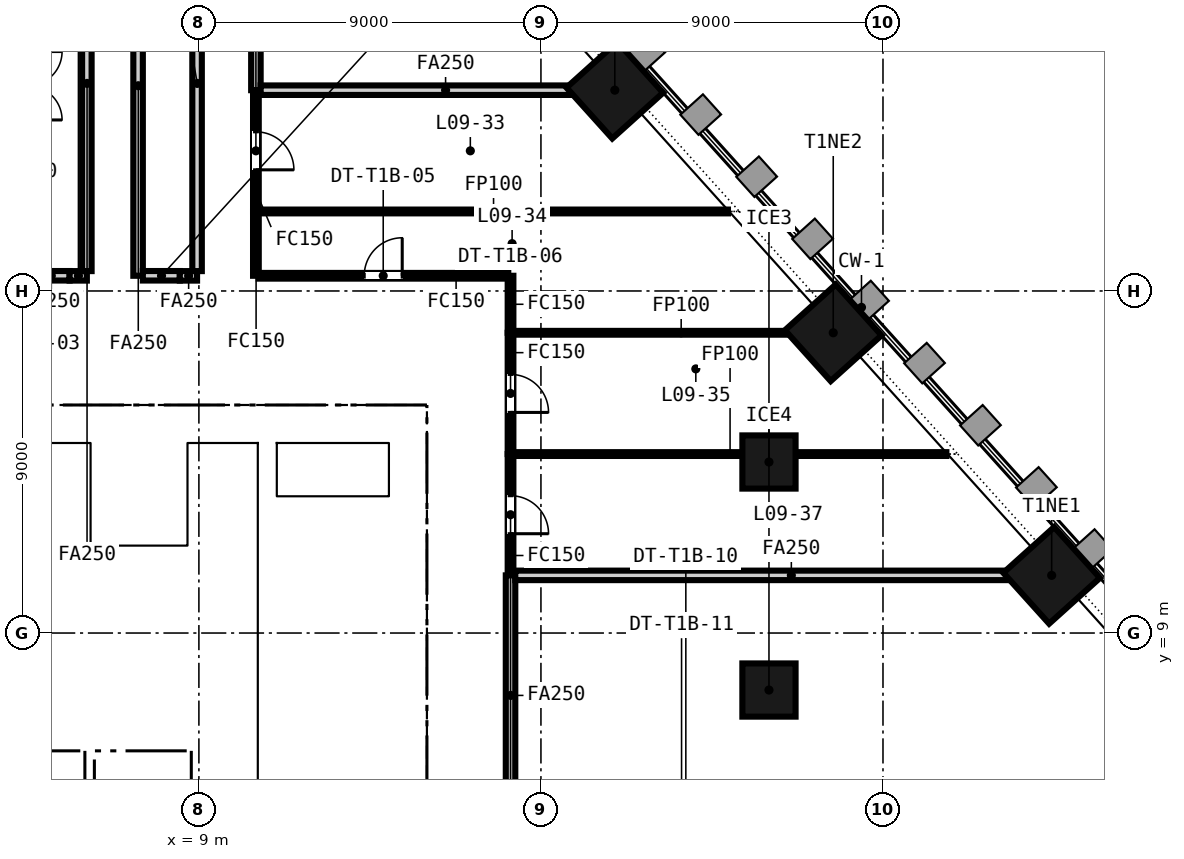
"""IFC4 building model, lengths in metres.
Left out: names, types, materials, properties, quantities, classifications, styles, units other than length and angle.
Written with IfcOpenShell. Run it as: python <this file> out.ifc"""

import sys

from ifc_helpers import new_model, si_unit, direction, frame, frame_2d, origin, origin_2d, place, context, subcontext, project, spatial, rectangle, extrude, element, fill, save


model = new_model("IFC4")
c1 = context("Model", 3, precision=1e-05, world=origin(), true_north=direction((0.0, 1.0)))
c2 = subcontext(c1, "Body", "Model", "MODEL_VIEW")
j1 = project(units=[si_unit("LENGTHUNIT", "METRE"), si_unit("PLANEANGLEUNIT", "RADIAN")], contexts=[c1])
p1 = place(None, origin())
s1 = spatial("IfcSite", under=j1, at=p1, CompositionType="ELEMENT")
p2 = place(p1, origin())
s2 = spatial("IfcBuilding", under=s1, at=p2, CompositionType="ELEMENT")
p3 = place(p2, frame((0.0, 0.0, 46.95)))
s3 = spatial("IfcBuildingStorey", under=s2, at=p3, CompositionType="ELEMENT", Elevation=46.95)
p4 = place(p3, frame((-15.0, 14.5, -0.15), z_axis=(0.0, 0.0, 1.0), x_axis=(1.0, 0.0, 0.0)))
e1 = element("IfcWall", 1, at=p4, inside=s3, PredefinedType="SOLIDWALL", context=c2, shape_type="SweptSolid", body=[
    extrude(rectangle(XDim=30.0, YDim=1.0, at=frame_2d((15.0, 0.0))), origin(), (0.0, 0.0, 1.0), 3.65),
])
p5 = place(p4, frame((9.25, 0.0, 0.15)))
e2 = element("IfcOpeningElement", 2, at=p5, cuts=e1, PredefinedType="OPENING", context=c2, shape_type="SweptSolid", body=[
    extrude(rectangle(XDim=1.5, YDim=2.1, at=frame_2d((0.75, 1.05))), frame((0.0, 0.51, 0.0), z_axis=(0.0, -1.0, 0.0), x_axis=(1.0, 0.0, 0.0)), (0.0, 0.0, 1.0), 1.02),
])
p6 = place(p4, frame((19.4, 0.0, 0.15)))
e3 = element("IfcOpeningElement", 3, at=p6, cuts=e1, PredefinedType="OPENING", context=c2, shape_type="SweptSolid", body=[
    extrude(rectangle(XDim=1.5, YDim=2.1, at=frame_2d((0.75, 1.05))), frame((0.0, 0.51, 0.0), z_axis=(0.0, -1.0, 0.0), x_axis=(1.0, 0.0, 0.0)), (0.0, 0.0, 1.0), 1.02),
])
p7 = place(p4, frame((1.5, 0.0, 0.15)))
e4 = element("IfcOpeningElement", 4, at=p7, cuts=e1, PredefinedType="OPENING", context=c2, shape_type="SweptSolid", body=[
    extrude(rectangle(XDim=1.2, YDim=2.1, at=frame_2d((0.6, 1.05))), frame((0.0, 0.51, 0.0), z_axis=(0.0, -1.0, 0.0), x_axis=(1.0, 0.0, 0.0)), (0.0, 0.0, 1.0), 1.02),
])
p8 = place(p4, frame((27.3, 0.0, 0.15)))
e5 = element("IfcOpeningElement", 5, at=p8, cuts=e1, PredefinedType="OPENING", context=c2, shape_type="SweptSolid", body=[
    extrude(rectangle(XDim=1.2, YDim=2.1, at=frame_2d((0.6, 1.05))), frame((0.0, 0.51, 0.0), z_axis=(0.0, -1.0, 0.0), x_axis=(1.0, 0.0, 0.0)), (0.0, 0.0, 1.0), 1.02),
])
p9 = place(p3, frame((14.5, 1.0, -0.15), z_axis=(0.0, 0.0, 1.0), x_axis=(0.0, 1.0, 0.0)))
e6 = element("IfcWall", 6, at=p9, inside=s3, PredefinedType="SOLIDWALL", context=c2, shape_type="SweptSolid", body=[
    extrude(rectangle(XDim=13.0, YDim=1.0, at=frame_2d((6.5, 0.0))), origin(), (0.0, 0.0, 1.0), 3.65),
])
p10 = place(p3, frame((10.8, 1.0, -0.15), z_axis=(0.0, 0.0, 1.0), x_axis=(0.0, 1.0, 0.0)))
e7 = element("IfcWall", 7, at=p10, inside=s3, PredefinedType="SOLIDWALL", context=c2, shape_type="SweptSolid", body=[
    extrude(rectangle(XDim=13.0, YDim=0.5, at=frame_2d((6.5, 0.0))), origin(), (0.0, 0.0, 1.0), 3.65),
])
for number, where, z_axis, x_axis in (
    (8, (31.438, 10.517, -0.15), (0.0, 0.0, 1.0), (-0.669, 0.743, 0.0)),
    (9, (25.691, 16.9, -0.15), (0.0, 0.0, 1.0), (-0.669, 0.743, 0.0)),
    (10, (19.944, 23.283, -0.15), (0.0, 0.0, 1.0), (-0.669, 0.743, 0.0)),
):
    element("IfcColumn", number, at=place(p3, frame(where, z_axis=z_axis, x_axis=x_axis)), inside=s3, PredefinedType="COLUMN", context=c2, shape_type="SweptSolid", body=[
        extrude(rectangle(XDim=1.8, YDim=1.8, at=origin_2d()), origin(), (0.0, 0.0, 1.0), 3.65),
    ])
for number, where, z_axis, x_axis in (
    (11, (24.0, 7.5, -0.15), (0.0, 0.0, 1.0), (1.0, 0.0, 0.0)),
    (12, (24.0, 13.5, -0.15), (0.0, 0.0, 1.0), (1.0, 0.0, 0.0)),
):
    element("IfcColumn", number, at=place(p3, frame(where, z_axis=z_axis, x_axis=x_axis)), inside=s3, PredefinedType="COLUMN", context=c2, shape_type="SweptSolid", body=[
        extrude(rectangle(XDim=1.4, YDim=1.4, at=origin_2d()), origin(), (0.0, 0.0, 1.0), 3.65),
    ])
p11 = place(p3, frame((-10.55, 6.025, 0.0), z_axis=(0.0, 0.0, 1.0), x_axis=(1.0, 0.0, 0.0)))
e13 = element("IfcWall", 13, at=p11, inside=s3, PredefinedType="PARTITIONING", context=c2, shape_type="SweptSolid", body=[
    extrude(rectangle(XDim=21.1, YDim=0.25, at=frame_2d((10.55, 0.0))), origin(), (0.0, 0.0, 1.0), 3.5),
])
p12 = place(p3, frame((-4.125, 8.55, 0.0), z_axis=(0.0, 0.0, 1.0), x_axis=(1.0, 0.0, 0.0)))
e14 = element("IfcWall", 14, at=p12, inside=s3, PredefinedType="PARTITIONING", context=c2, shape_type="SweptSolid", body=[
    extrude(rectangle(XDim=14.675, YDim=0.2, at=frame_2d((7.337, 0.0))), origin(), (0.0, 0.0, 1.0), 3.5),
])
p13 = place(p12, frame((2.438, 0.0, 0.0)))
e15 = element("IfcOpeningElement", 15, at=p13, cuts=e14, PredefinedType="OPENING", context=c2, shape_type="SweptSolid", body=[
    extrude(rectangle(XDim=1.0, YDim=2.1, at=frame_2d((0.5, 1.05))), frame((0.0, 0.11, 0.0), z_axis=(0.0, -1.0, 0.0), x_axis=(1.0, 0.0, 0.0)), (0.0, 0.0, 1.0), 0.22),
])
p14 = place(p12, frame((6.775, 0.0, 0.0)))
e16 = element("IfcOpeningElement", 16, at=p14, cuts=e14, PredefinedType="OPENING", context=c2, shape_type="SweptSolid", body=[
    extrude(rectangle(XDim=1.0, YDim=2.1, at=frame_2d((0.5, 1.05))), frame((0.0, 0.11, 0.0), z_axis=(0.0, -1.0, 0.0), x_axis=(1.0, 0.0, 0.0)), (0.0, 0.0, 1.0), 0.22),
])
p15 = place(p12, frame((10.363, 0.0, 0.0)))
e17 = element("IfcOpeningElement", 17, at=p15, cuts=e14, PredefinedType="OPENING", context=c2, shape_type="SweptSolid", body=[
    extrude(rectangle(XDim=1.0, YDim=2.1, at=frame_2d((0.5, 1.05))), frame((0.0, 0.11, 0.0), z_axis=(0.0, -1.0, 0.0), x_axis=(1.0, 0.0, 0.0)), (0.0, 0.0, 1.0), 0.22),
])
p16 = place(p12, frame((13.475, 0.0, 0.0)))
e18 = element("IfcOpeningElement", 18, at=p16, cuts=e14, PredefinedType="OPENING", context=c2, shape_type="SweptSolid", body=[
    extrude(rectangle(XDim=0.9, YDim=2.1, at=frame_2d((0.45, 1.05))), frame((0.0, 0.11, 0.0), z_axis=(0.0, -1.0, 0.0), x_axis=(1.0, 0.0, 0.0)), (0.0, 0.0, 1.0), 0.22),
])
p17 = place(p3, frame((5.9, 11.2, 0.0), z_axis=(0.0, 0.0, 1.0), x_axis=(1.0, 0.0, 0.0)))
e19 = element("IfcWall", 19, at=p17, inside=s3, PredefinedType="PARTITIONING", context=c2, shape_type="SweptSolid", body=[
    extrude(rectangle(XDim=4.65, YDim=0.2, at=frame_2d((2.325, 0.0))), origin(), (0.0, 0.0, 1.0), 3.5),
])
p18 = place(p17, frame((3.4, 0.0, 0.0)))
e20 = element("IfcOpeningElement", 20, at=p18, cuts=e19, PredefinedType="OPENING", context=c2, shape_type="SweptSolid", body=[
    extrude(rectangle(XDim=0.9, YDim=2.1, at=frame_2d((0.45, 1.05))), frame((0.0, 0.11, 0.0), z_axis=(0.0, -1.0, 0.0), x_axis=(1.0, 0.0, 0.0)), (0.0, 0.0, 1.0), 0.22),
])
for number, where, z_axis, x_axis in (
    (21, (6.125, 3.6, 0.0), (0.0, 0.0, 1.0), (0.0, 1.0, 0.0)),
    (22, (8.925, 3.6, 0.0), (0.0, 0.0, 1.0), (0.0, 1.0, 0.0)),
):
    element("IfcWall", number, at=place(p3, frame(where, z_axis=z_axis, x_axis=x_axis)), inside=s3, PredefinedType="PARTITIONING", context=c2, shape_type="SweptSolid", body=[
        extrude(rectangle(XDim=2.3, YDim=0.25, at=frame_2d((1.15, 0.0))), origin(), (0.0, 0.0, 1.0), 3.5),
    ])
p19 = place(p3, frame((8.925, 6.15, 0.0), z_axis=(0.0, 0.0, 1.0), x_axis=(0.0, 1.0, 0.0)))
e23 = element("IfcWall", 23, at=p19, inside=s3, PredefinedType="PARTITIONING", context=c2, shape_type="SweptSolid", body=[
    extrude(rectangle(XDim=2.3, YDim=0.25, at=frame_2d((1.15, 0.0))), origin(), (0.0, 0.0, 1.0), 3.5),
])
for number, where, z_axis, x_axis in (
    (24, (6.025, 11.3, 0.0), (0.0, 0.0, 1.0), (0.0, 1.0, 0.0)),
    (25, (8.825, 11.3, 0.0), (0.0, 0.0, 1.0), (0.0, 1.0, 0.0)),
):
    element("IfcWall", number, at=place(p3, frame(where, z_axis=z_axis, x_axis=x_axis)), inside=s3, PredefinedType="PARTITIONING", context=c2, shape_type="SweptSolid", body=[
        extrude(rectangle(XDim=2.7, YDim=0.25, at=frame_2d((1.35, 0.0))), origin(), (0.0, 0.0, 1.0), 3.5),
    ])
p20 = place(p3, frame((11.05, 7.35, -0.15), z_axis=(0.0, 0.0, 1.0), x_axis=(1.0, 0.0, 0.0)))
e26 = element("IfcWall", 26, at=p20, inside=s3, PredefinedType="SOLIDWALL", context=c2, shape_type="SweptSolid", body=[
    extrude(rectangle(XDim=2.95, YDim=0.3, at=frame_2d((1.475, 0.0))), origin(), (0.0, 0.0, 1.0), 3.65),
])
p21 = place(p3, frame((7.4, 28.4, 0.0), z_axis=(0.0, 0.0, 1.0), x_axis=(0.0, -1.0, 0.0)))
e27 = element("IfcWall", 27, at=p21, inside=s3, PredefinedType="PARTITIONING", context=c2, shape_type="SweptSolid", body=[
    extrude(rectangle(XDim=10.0, YDim=0.25, at=frame_2d((5.0, 0.0))), origin(), (0.0, 0.0, 1.0), 2.741),
])
p22 = place(p3, frame((10.5, 28.4, 0.0), z_axis=(0.0, 0.0, 1.0), x_axis=(0.0, -1.0, 0.0)))
e28 = element("IfcWall", 28, at=p22, inside=s3, PredefinedType="PARTITIONING", context=c2, shape_type="SweptSolid", body=[
    extrude(rectangle(XDim=5.117, YDim=0.25, at=frame_2d((2.559, 0.0))), origin(), (0.0, 0.0, 1.0), 2.741),
])
p23 = place(p3, frame((10.5, 23.283, 0.0), z_axis=(0.0, 0.0, 1.0), x_axis=(0.0, -1.0, 0.0)))
e29 = element("IfcWall", 29, at=p23, inside=s3, PredefinedType="PARTITIONING", context=c2, shape_type="SweptSolid", body=[
    extrude(rectangle(XDim=3.191, YDim=0.15, at=frame_2d((1.595, 0.0))), origin(), (0.0, 0.0, 1.0), 2.741),
])
p24 = place(p23, frame((1.095, 0.0, 0.0)))
e30 = element("IfcOpeningElement", 30, at=p24, cuts=e29, PredefinedType="OPENING", context=c2, shape_type="SweptSolid", body=[
    extrude(rectangle(XDim=1.0, YDim=2.1, at=frame_2d((0.5, 1.05))), frame((0.0, 0.085, 0.0), z_axis=(0.0, -1.0, 0.0), x_axis=(1.0, 0.0, 0.0)), (0.0, 0.0, 1.0), 0.17),
])
p25 = place(p3, frame((10.5, 20.092, 0.0), z_axis=(0.0, 0.0, 1.0), x_axis=(0.0, -1.0, 0.0)))
e31 = element("IfcWall", 31, at=p25, inside=s3, PredefinedType="PARTITIONING", context=c2, shape_type="SweptSolid", body=[
    extrude(rectangle(XDim=1.692, YDim=0.15, at=frame_2d((0.846, 0.0))), origin(), (0.0, 0.0, 1.0), 2.741),
])
p26 = place(p3, frame((17.2, 18.4, 0.0), z_axis=(0.0, 0.0, 1.0), x_axis=(0.0, -1.0, 0.0)))
e32 = element("IfcWall", 32, at=p26, inside=s3, PredefinedType="PARTITIONING", context=c2, shape_type="SweptSolid", body=[
    extrude(rectangle(XDim=1.5, YDim=0.15, at=frame_2d((0.75, 0.0))), origin(), (0.0, 0.0, 1.0), 2.741),
])
p27 = place(p3, frame((17.2, 16.9, 0.0), z_axis=(0.0, 0.0, 1.0), x_axis=(0.0, -1.0, 0.0)))
e33 = element("IfcWall", 33, at=p27, inside=s3, PredefinedType="PARTITIONING", context=c2, shape_type="SweptSolid", body=[
    extrude(rectangle(XDim=3.191, YDim=0.15, at=frame_2d((1.595, 0.0))), origin(), (0.0, 0.0, 1.0), 2.741),
])
p28 = place(p27, frame((1.095, 0.0, 0.0)))
e34 = element("IfcOpeningElement", 34, at=p28, cuts=e33, PredefinedType="OPENING", context=c2, shape_type="SweptSolid", body=[
    extrude(rectangle(XDim=1.0, YDim=2.1, at=frame_2d((0.5, 1.05))), frame((0.0, 0.085, 0.0), z_axis=(0.0, -1.0, 0.0), x_axis=(1.0, 0.0, 0.0)), (0.0, 0.0, 1.0), 0.17),
])
p29 = place(p3, frame((17.2, 13.709, 0.0), z_axis=(0.0, 0.0, 1.0), x_axis=(0.0, -1.0, 0.0)))
e35 = element("IfcWall", 35, at=p29, inside=s3, PredefinedType="PARTITIONING", context=c2, shape_type="SweptSolid", body=[
    extrude(rectangle(XDim=3.192, YDim=0.15, at=frame_2d((1.596, 0.0))), origin(), (0.0, 0.0, 1.0), 2.741),
])
p30 = place(p29, frame((1.096, 0.0, 0.0)))
e36 = element("IfcOpeningElement", 36, at=p30, cuts=e35, PredefinedType="OPENING", context=c2, shape_type="SweptSolid", body=[
    extrude(rectangle(XDim=1.0, YDim=2.1, at=frame_2d((0.5, 1.05))), frame((0.0, 0.085, 0.0), z_axis=(0.0, -1.0, 0.0), x_axis=(1.0, 0.0, 0.0)), (0.0, 0.0, 1.0), 0.17),
])
p31 = place(p3, frame((17.2, 10.517, 0.0), z_axis=(0.0, 0.0, 1.0), x_axis=(0.0, -1.0, 0.0)))
e37 = element("IfcWall", 37, at=p31, inside=s3, PredefinedType="PARTITIONING", context=c2, shape_type="SweptSolid", body=[
    extrude(rectangle(XDim=6.317, YDim=0.25, at=frame_2d((3.159, 0.0))), origin(), (0.0, 0.0, 1.0), 2.741),
])
p32 = place(p3, frame((4.625, 18.4, 0.0), z_axis=(0.0, 0.0, 1.0), x_axis=(1.0, 0.0, 0.0)))
e38 = element("IfcWall", 38, at=p32, inside=s3, PredefinedType="PARTITIONING", context=c2, shape_type="SweptSolid", body=[
    extrude(rectangle(XDim=0.973, YDim=0.25, at=frame_2d((0.486, 0.0))), origin(), (0.0, 0.0, 1.0), 2.741),
])
p33 = place(p3, frame((5.598, 18.398, 0.0), z_axis=(0.0, 0.0, 1.0), x_axis=(1.0, 0.0, 0.0)))
e39 = element("IfcWall", 39, at=p33, inside=s3, PredefinedType="PARTITIONING", context=c2, shape_type="SweptSolid", body=[
    extrude(rectangle(XDim=0.454, YDim=0.25, at=frame_2d((0.227, 0.0))), origin(), (0.0, 0.0, 1.0), 2.741),
])
p34 = place(p3, frame((6.052, 18.523, 0.0), z_axis=(0.0, 0.0, 1.0), x_axis=(0.0, 1.0, 0.0)))
e40 = element("IfcWall", 40, at=p34, inside=s3, PredefinedType="PARTITIONING", context=c2, shape_type="SweptSolid", body=[
    extrude(rectangle(XDim=9.877, YDim=0.25, at=frame_2d((4.938, 0.0))), origin(), (0.0, 0.0, 1.0), 2.741),
])
p35 = place(p3, frame((7.525, 18.4, 0.0), z_axis=(0.0, 0.0, 1.0), x_axis=(1.0, 0.0, 0.0)))
e41 = element("IfcWall", 41, at=p35, inside=s3, PredefinedType="PARTITIONING", context=c2, shape_type="SweptSolid", body=[
    extrude(rectangle(XDim=0.973, YDim=0.25, at=frame_2d((0.487, 0.0))), origin(), (0.0, 0.0, 1.0), 2.741),
])
p36 = place(p3, frame((8.498, 18.398, 0.0), z_axis=(0.0, 0.0, 1.0), x_axis=(1.0, 0.0, 0.0)))
e42 = element("IfcWall", 42, at=p36, inside=s3, PredefinedType="PARTITIONING", context=c2, shape_type="SweptSolid", body=[
    extrude(rectangle(XDim=0.454, YDim=0.25, at=frame_2d((0.227, 0.0))), origin(), (0.0, 0.0, 1.0), 2.741),
])
p37 = place(p3, frame((8.952, 18.523, 0.0), z_axis=(0.0, 0.0, 1.0), x_axis=(0.0, 1.0, 0.0)))
e43 = element("IfcWall", 43, at=p37, inside=s3, PredefinedType="PARTITIONING", context=c2, shape_type="SweptSolid", body=[
    extrude(rectangle(XDim=9.877, YDim=0.25, at=frame_2d((4.938, 0.0))), origin(), (0.0, 0.0, 1.0), 2.741),
])
p38 = place(p3, frame((10.625, 23.283, 0.0), z_axis=(0.0, 0.0, 1.0), x_axis=(1.0, 0.0, 0.0)))
e44 = element("IfcWall", 44, at=p38, inside=s3, PredefinedType="PARTITIONING", context=c2, shape_type="SweptSolid", body=[
    extrude(rectangle(XDim=9.722, YDim=0.25, at=frame_2d((4.861, 0.0))), origin(), (0.0, 0.0, 1.0), 2.741),
])
p39 = place(p3, frame((10.575, 20.092, 0.0), z_axis=(0.0, 0.0, 1.0), x_axis=(1.0, 0.0, 0.0)))
e45 = element("IfcWall", 45, at=p39, inside=s3, PredefinedType="PARTITIONING", context=c2, shape_type="SweptSolid", body=[
    extrude(rectangle(XDim=12.346, YDim=0.1, at=frame_2d((6.173, 0.0))), origin(), (0.0, 0.0, 1.0), 2.741),
])
p40 = place(p3, frame((10.575, 18.4, 0.0), z_axis=(0.0, 0.0, 1.0), x_axis=(1.0, 0.0, 0.0)))
e46 = element("IfcWall", 46, at=p40, inside=s3, PredefinedType="PARTITIONING", context=c2, shape_type="SweptSolid", body=[
    extrude(rectangle(XDim=6.55, YDim=0.15, at=frame_2d((3.275, 0.0))), origin(), (0.0, 0.0, 1.0), 2.741),
])
p41 = place(p40, frame((2.775, 0.0, 0.0)))
e47 = element("IfcOpeningElement", 47, at=p41, cuts=e46, PredefinedType="OPENING", context=c2, shape_type="SweptSolid", body=[
    extrude(rectangle(XDim=1.0, YDim=2.1, at=frame_2d((0.5, 1.05))), frame((0.0, 0.085, 0.0), z_axis=(0.0, -1.0, 0.0), x_axis=(1.0, 0.0, 0.0)), (0.0, 0.0, 1.0), 0.17),
])
p42 = place(p3, frame((17.275, 16.9, 0.0), z_axis=(0.0, 0.0, 1.0), x_axis=(1.0, 0.0, 0.0)))
e48 = element("IfcWall", 48, at=p42, inside=s3, PredefinedType="PARTITIONING", context=c2, shape_type="SweptSolid", body=[
    extrude(rectangle(XDim=8.82, YDim=0.1, at=frame_2d((4.41, 0.0))), origin(), (0.0, 0.0, 1.0), 2.741),
])
p43 = place(p3, frame((17.275, 13.709, 0.0), z_axis=(0.0, 0.0, 1.0), x_axis=(1.0, 0.0, 0.0)))
e49 = element("IfcWall", 49, at=p43, inside=s3, PredefinedType="PARTITIONING", context=c2, shape_type="SweptSolid", body=[
    extrude(rectangle(XDim=11.393, YDim=0.1, at=frame_2d((5.697, 0.0))), origin(), (0.0, 0.0, 1.0), 2.741),
])
p44 = place(p3, frame((17.325, 10.517, 0.0), z_axis=(0.0, 0.0, 1.0), x_axis=(1.0, 0.0, 0.0)))
e50 = element("IfcWall", 50, at=p44, inside=s3, PredefinedType="PARTITIONING", context=c2, shape_type="SweptSolid", body=[
    extrude(rectangle(XDim=14.517, YDim=0.25, at=frame_2d((7.259, 0.0))), origin(), (0.0, 0.0, 1.0), 2.741),
])
p45 = place(p15, origin())
e51 = element("IfcDoor", 51, at=p45, inside=s3, OperationType="SINGLE_SWING_LEFT", PredefinedType="DOOR", context=c2, shape_type="SweptSolid", body=[
    extrude(rectangle(XDim=1.0, YDim=2.1, at=frame_2d((0.5, 1.05))), frame((0.0, 0.025, 0.0), z_axis=(0.0, -1.0, 0.0), x_axis=(1.0, 0.0, 0.0)), (0.0, 0.0, 1.0), 0.05),
])
fill(e17, e51)
p46 = place(p16, origin())
e52 = element("IfcDoor", 52, at=p46, inside=s3, OperationType="SINGLE_SWING_RIGHT", PredefinedType="DOOR", context=c2, shape_type="SweptSolid", body=[
    extrude(rectangle(XDim=0.9, YDim=2.1, at=frame_2d((0.45, 1.05))), frame((0.0, 0.025, 0.0), z_axis=(0.0, -1.0, 0.0), x_axis=(1.0, 0.0, 0.0)), (0.0, 0.0, 1.0), 0.05),
])
fill(e18, e52)
p47 = place(p18, origin())
e53 = element("IfcDoor", 53, at=p47, inside=s3, OperationType="SINGLE_SWING_LEFT", PredefinedType="DOOR", context=c2, shape_type="SweptSolid", body=[
    extrude(rectangle(XDim=0.9, YDim=2.1, at=frame_2d((0.45, 1.05))), frame((0.0, 0.025, 0.0), z_axis=(0.0, -1.0, 0.0), x_axis=(1.0, 0.0, 0.0)), (0.0, 0.0, 1.0), 0.05),
])
fill(e20, e53)
p48 = place(p6, origin())
e54 = element("IfcDoor", 54, at=p48, inside=s3, OperationType="DOUBLE_DOOR_SINGLE_SWING", PredefinedType="DOOR", context=c2, shape_type="SweptSolid", body=[
    extrude(rectangle(XDim=1.5, YDim=2.1, at=frame_2d((0.75, 1.05))), frame((0.0, 0.025, 0.0), z_axis=(0.0, -1.0, 0.0), x_axis=(1.0, 0.0, 0.0)), (0.0, 0.0, 1.0), 0.05),
])
fill(e3, e54)
p49 = place(p8, origin())
e55 = element("IfcDoor", 55, at=p49, inside=s3, OperationType="SINGLE_SWING_LEFT", PredefinedType="DOOR", context=c2, shape_type="SweptSolid", body=[
    extrude(rectangle(XDim=1.2, YDim=2.1, at=frame_2d((0.6, 1.05))), frame((0.0, 0.025, 0.0), z_axis=(0.0, -1.0, 0.0), x_axis=(1.0, 0.0, 0.0)), (0.0, 0.0, 1.0), 0.05),
])
fill(e5, e55)
p50 = place(p24, origin())
e56 = element("IfcDoor", 56, at=p50, inside=s3, OperationType="SINGLE_SWING_RIGHT", PredefinedType="DOOR", context=c2, shape_type="SweptSolid", body=[
    extrude(rectangle(XDim=1.0, YDim=2.1, at=frame_2d((0.5, 1.05))), frame((0.0, 0.025, 0.0), z_axis=(0.0, -1.0, 0.0), x_axis=(1.0, 0.0, 0.0)), (0.0, 0.0, 1.0), 0.05),
])
fill(e30, e56)
p51 = place(p41, origin())
e57 = element("IfcDoor", 57, at=p51, inside=s3, OperationType="SINGLE_SWING_RIGHT", PredefinedType="DOOR", context=c2, shape_type="SweptSolid", body=[
    extrude(rectangle(XDim=1.0, YDim=2.1, at=frame_2d((0.5, 1.05))), frame((0.0, 0.025, 0.0), z_axis=(0.0, -1.0, 0.0), x_axis=(1.0, 0.0, 0.0)), (0.0, 0.0, 1.0), 0.05),
])
fill(e47, e57)
p52 = place(p28, origin())
e58 = element("IfcDoor", 58, at=p52, inside=s3, OperationType="SINGLE_SWING_RIGHT", PredefinedType="DOOR", context=c2, shape_type="SweptSolid", body=[
    extrude(rectangle(XDim=1.0, YDim=2.1, at=frame_2d((0.5, 1.05))), frame((0.0, 0.025, 0.0), z_axis=(0.0, -1.0, 0.0), x_axis=(1.0, 0.0, 0.0)), (0.0, 0.0, 1.0), 0.05),
])
fill(e34, e58)
p53 = place(p30, origin())
e59 = element("IfcDoor", 59, at=p53, inside=s3, OperationType="SINGLE_SWING_RIGHT", PredefinedType="DOOR", context=c2, shape_type="SweptSolid", body=[
    extrude(rectangle(XDim=1.0, YDim=2.1, at=frame_2d((0.5, 1.05))), frame((0.0, 0.025, 0.0), z_axis=(0.0, -1.0, 0.0), x_axis=(1.0, 0.0, 0.0)), (0.0, 0.0, 1.0), 0.05),
])
fill(e36, e59)
save(model, sys.argv[1])
